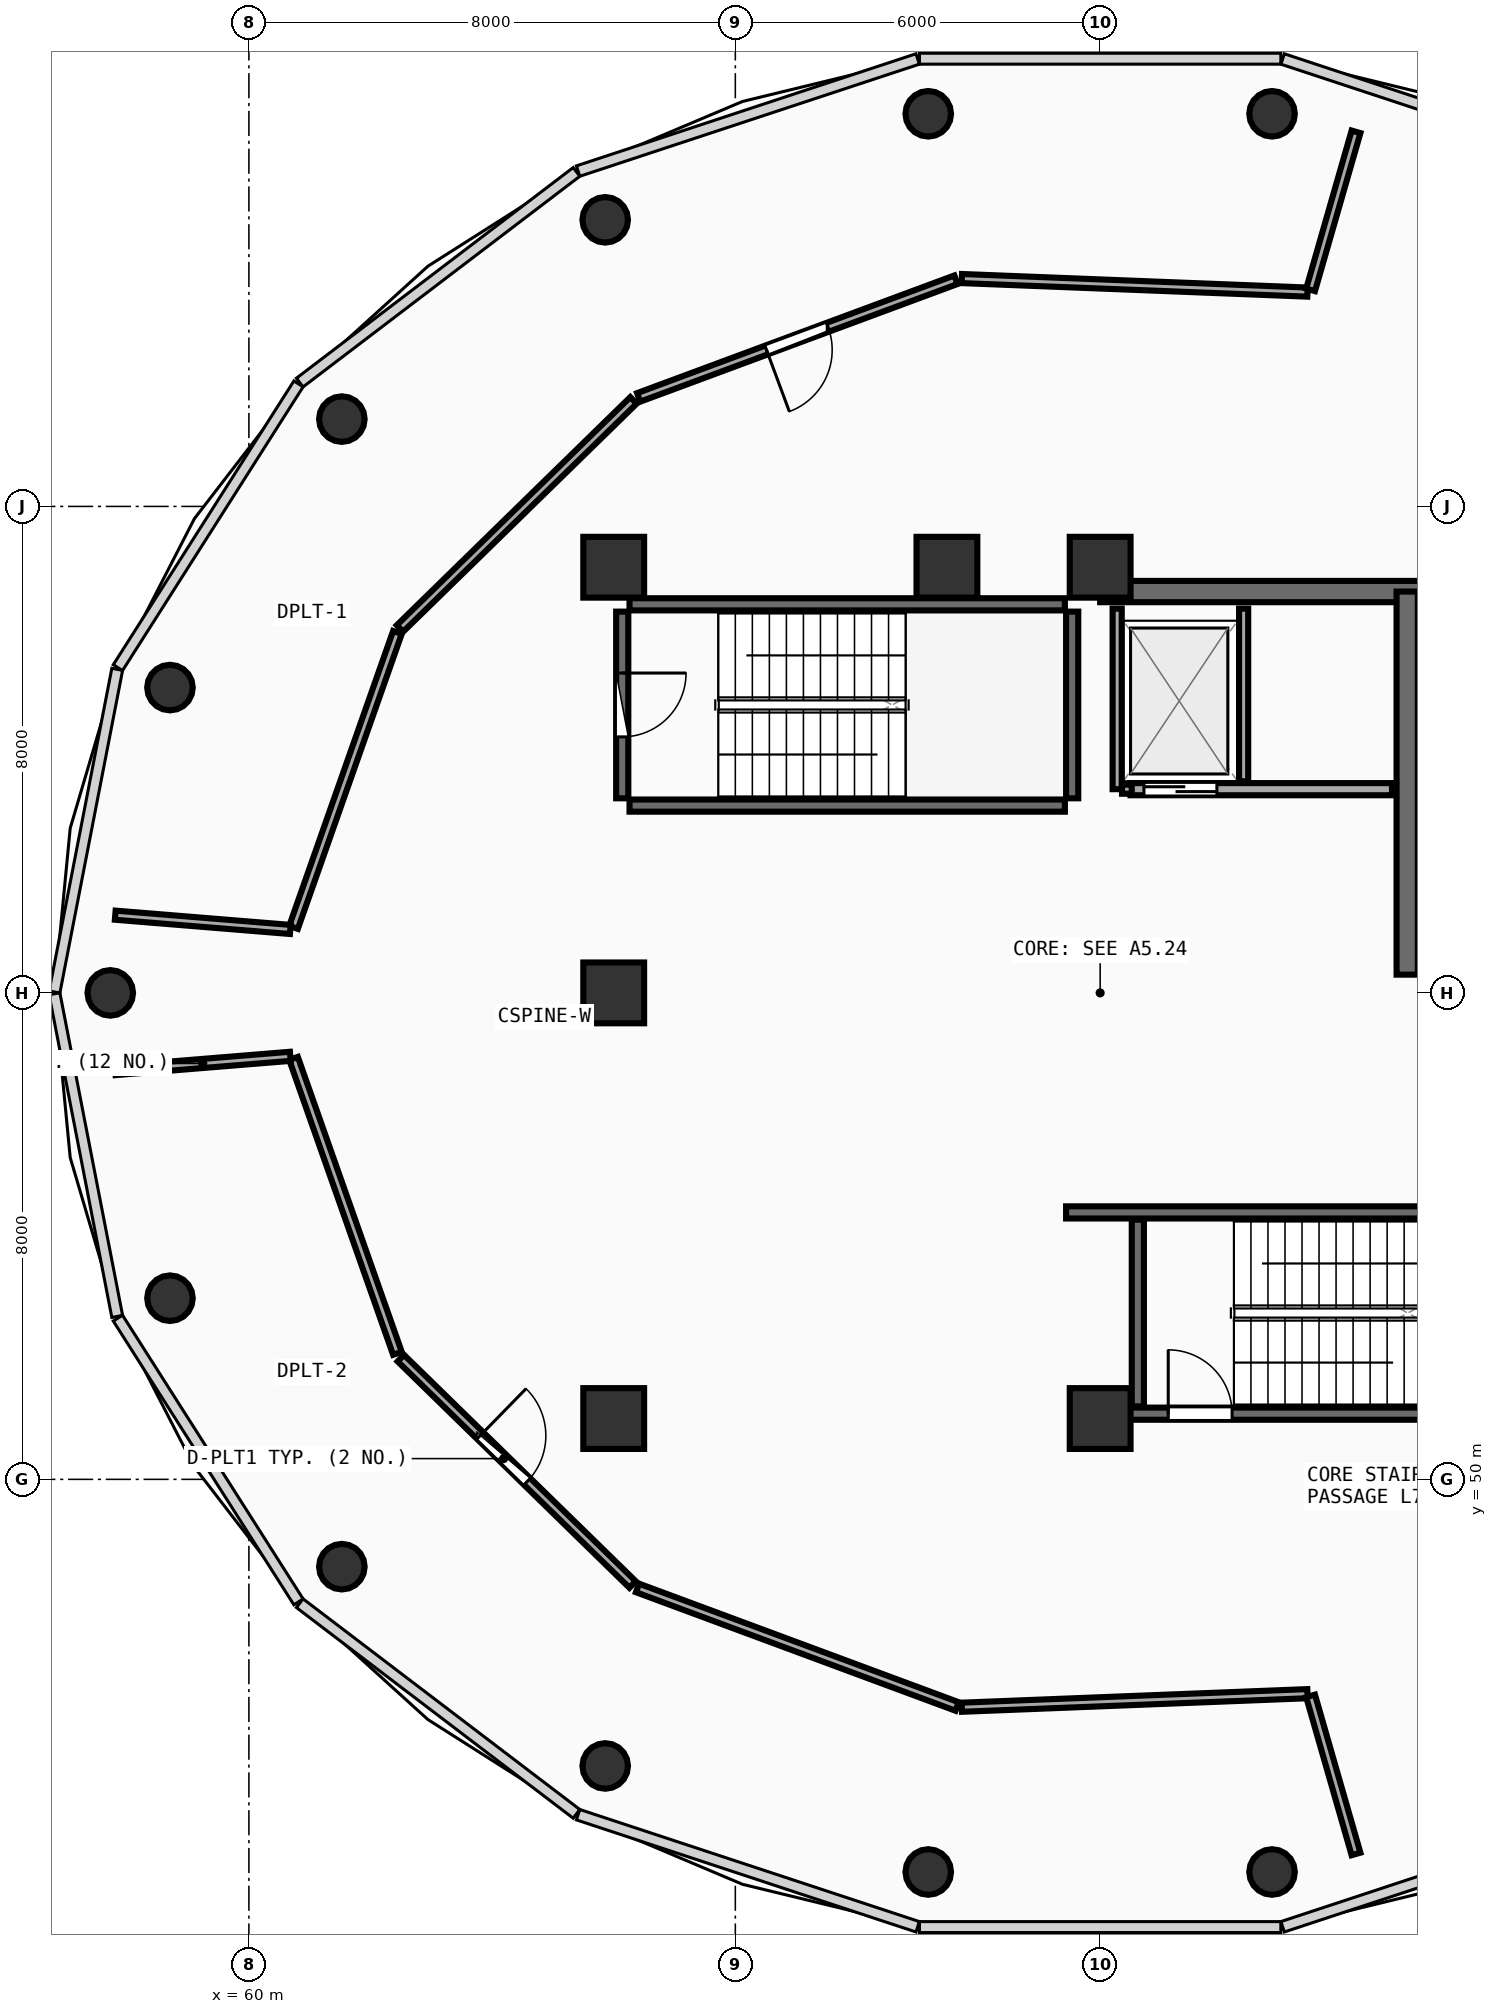
"""IFC4 building model, lengths in metres.
Left out: names, types, materials, properties, quantities, classifications, styles, units other than length and angle.
Written with IfcOpenShell. Run it as: python <this file> out.ifc"""

import sys

from ifc_helpers import new_model, si_unit, direction, frame, frame_2d, origin, origin_2d, place, context, subcontext, project, spatial, rectangle, circle, extrude, element, fill, save


model = new_model("IFC4")
c1 = context("Model", 3, precision=1e-05, world=origin(), true_north=direction((0.0, 1.0)))
c2 = subcontext(c1, "Body", "Model", "MODEL_VIEW")
j1 = project(units=[si_unit("LENGTHUNIT", "METRE"), si_unit("PLANEANGLEUNIT", "RADIAN")], contexts=[c1])
p1 = place(None, origin())
s1 = spatial("IfcSite", under=j1, at=p1, CompositionType="ELEMENT")
p2 = place(p1, origin())
s2 = spatial("IfcBuilding", under=s1, at=p2, CompositionType="ELEMENT")
p3 = place(p2, frame((0.0, 0.0, 306.9)))
s3 = spatial("IfcBuildingStorey", under=s2, at=p3, CompositionType="ELEMENT", Elevation=306.9)
for number, where, z_axis, x_axis in (
    (1, (66.0, 51.0, 0.0), (0.0, 0.0, 1.0), (1.0, 0.0, 0.0)),
    (2, (74.0, 51.0, 0.0), (0.0, 0.0, 1.0), (1.0, 0.0, 0.0)),
    (3, (74.0, 65.0, 0.0), (0.0, 0.0, 1.0), (1.0, 0.0, 0.0)),
    (4, (71.48, 65.0, 0.0), (0.0, 0.0, 1.0), (1.0, 0.0, 0.0)),
    (5, (66.0, 65.0, 0.0), (0.0, 0.0, 1.0), (1.0, 0.0, 0.0)),
    (6, (66.0, 58.0, 0.0), (0.0, 0.0, 1.0), (1.0, 0.0, 0.0)),
):
    element("IfcColumn", number, at=place(p3, frame(where, z_axis=z_axis, x_axis=x_axis)), inside=s3, PredefinedType="PILASTER", context=c2, shape_type="SweptSolid", body=[
        extrude(rectangle(XDim=1.0, YDim=1.0, at=origin_2d()), origin(), (0.0, 0.0, 1.0), 4.2),
    ])
for number, where, z_axis, x_axis in (
    (7, (76.827, 72.457, 0.0), (0.0, 0.0, 1.0), (1.0, 0.0, 0.0)),
    (8, (71.173, 72.457, 0.0), (0.0, 0.0, 1.0), (1.0, 0.0, 0.0)),
    (9, (65.86, 70.713, 0.0), (0.0, 0.0, 1.0), (1.0, 0.0, 0.0)),
    (10, (61.529, 67.436, 0.0), (0.0, 0.0, 1.0), (1.0, 0.0, 0.0)),
    (11, (58.702, 63.021, 0.0), (0.0, 0.0, 1.0), (1.0, 0.0, 0.0)),
    (12, (57.72, 58.0, 0.0), (0.0, 0.0, 1.0), (1.0, 0.0, 0.0)),
    (13, (58.702, 52.979, 0.0), (0.0, 0.0, 1.0), (1.0, 0.0, 0.0)),
    (14, (61.529, 48.564, 0.0), (0.0, 0.0, 1.0), (1.0, 0.0, 0.0)),
    (15, (65.86, 45.287, 0.0), (0.0, 0.0, 1.0), (1.0, 0.0, 0.0)),
    (16, (71.173, 43.543, 0.0), (0.0, 0.0, 1.0), (1.0, 0.0, 0.0)),
    (17, (76.827, 43.543, 0.0), (0.0, 0.0, 1.0), (1.0, 0.0, 0.0)),
):
    element("IfcColumn", number, at=place(p3, frame(where, z_axis=z_axis, x_axis=x_axis)), inside=s3, PredefinedType="COLUMN", context=c2, shape_type="SweptSolid", body=[
        extrude(circle(Radius=0.375, at=origin_2d()), origin(), (0.0, 0.0, 1.0), 4.2),
    ])
p4 = place(p3, frame((66.26, 61.08, 0.0), z_axis=(0.0, 0.0, 1.0), x_axis=(1.0, 0.0, 0.0)))
e18 = element("IfcWall", 18, at=p4, inside=s3, PredefinedType="SHEAR", context=c2, shape_type="SweptSolid", body=[
    extrude(rectangle(XDim=7.16, YDim=0.2, at=frame_2d((3.58, 0.0))), origin(), (0.0, 0.0, 1.0), 3.92),
])
p5 = place(p3, frame((73.54, 61.2, 0.0), z_axis=(0.0, 0.0, 1.0), x_axis=(0.0, 1.0, 0.0)))
e19 = element("IfcWall", 19, at=p5, inside=s3, PredefinedType="SHEAR", context=c2, shape_type="SweptSolid", body=[
    extrude(rectangle(XDim=3.07, YDim=0.2, at=frame_2d((1.535, 0.0))), origin(), (0.0, 0.0, 1.0), 3.92),
])
p6 = place(p3, frame((73.42, 64.39, 0.0), z_axis=(0.0, 0.0, 1.0), x_axis=(-1.0, 0.0, 0.0)))
e20 = element("IfcWall", 20, at=p6, inside=s3, PredefinedType="SHEAR", context=c2, shape_type="SweptSolid", body=[
    extrude(rectangle(XDim=7.16, YDim=0.2, at=frame_2d((3.58, 0.0))), origin(), (0.0, 0.0, 1.0), 3.92),
])
p7 = place(p3, frame((66.14, 64.27, 0.0), z_axis=(0.0, 0.0, 1.0), x_axis=(0.0, -1.0, 0.0)))
e21 = element("IfcWall", 21, at=p7, inside=s3, PredefinedType="SHEAR", context=c2, shape_type="SweptSolid", body=[
    extrude(rectangle(XDim=3.07, YDim=0.2, at=frame_2d((1.535, 0.0))), origin(), (0.0, 0.0, 1.0), 3.92),
])
p8 = place(p7, frame((1.01, 0.0, 0.0)))
e22 = element("IfcOpeningElement", 22, at=p8, cuts=e21, PredefinedType="OPENING", context=c2, shape_type="SweptSolid", body=[
    extrude(rectangle(XDim=1.05, YDim=2.1, at=frame_2d((0.525, 1.05))), frame((0.0, 0.11, 0.0), z_axis=(0.0, -1.0, 0.0), x_axis=(1.0, 0.0, 0.0)), (0.0, 0.0, 1.0), 0.22),
])
p9 = place(p3, frame((74.0, 51.08, 0.0), z_axis=(0.0, 0.0, 1.0), x_axis=(1.0, 0.0, 0.0)))
e23 = element("IfcWall", 23, at=p9, inside=s3, PredefinedType="SHEAR", context=c2, shape_type="SweptSolid", body=[
    extrude(rectangle(XDim=7.9, YDim=0.2, at=frame_2d((3.95, 0.0))), origin(), (0.0, 0.0, 1.0), 3.92),
])
p10 = place(p9, frame((1.12, 0.0, 0.0)))
e24 = element("IfcOpeningElement", 24, at=p10, cuts=e23, PredefinedType="OPENING", context=c2, shape_type="SweptSolid", body=[
    extrude(rectangle(XDim=1.05, YDim=2.1, at=frame_2d((0.525, 1.05))), frame((0.0, 0.11, 0.0), z_axis=(0.0, -1.0, 0.0), x_axis=(1.0, 0.0, 0.0)), (0.0, 0.0, 1.0), 0.22),
])
p11 = place(p3, frame((81.9, 54.39, 0.0), z_axis=(0.0, 0.0, 1.0), x_axis=(-1.0, 0.0, 0.0)))
e25 = element("IfcWall", 25, at=p11, inside=s3, PredefinedType="SHEAR", context=c2, shape_type="SweptSolid", body=[
    extrude(rectangle(XDim=8.46, YDim=0.2, at=frame_2d((4.23, 0.0))), origin(), (0.0, 0.0, 1.0), 3.92),
])
p12 = place(p3, frame((74.62, 54.27, 0.0), z_axis=(0.0, 0.0, 1.0), x_axis=(0.0, -1.0, 0.0)))
e26 = element("IfcWall", 26, at=p12, inside=s3, PredefinedType="SHEAR", context=c2, shape_type="SweptSolid", body=[
    extrude(rectangle(XDim=3.07, YDim=0.2, at=frame_2d((1.535, 0.0))), origin(), (0.0, 0.0, 1.0), 3.92),
])
p13 = place(p3, frame((74.0, 64.6, 0.0), z_axis=(0.0, 0.0, 1.0), x_axis=(1.0, 0.0, 0.0)))
e27 = element("IfcWall", 27, at=p13, inside=s3, PredefinedType="SHEAR", context=c2, shape_type="SweptSolid", body=[
    extrude(rectangle(XDim=8.0, YDim=0.35, at=frame_2d((4.0, 0.0))), origin(), (0.0, 0.0, 1.0), 3.98),
])
p14 = place(p3, frame((79.05, 58.3, 0.0), z_axis=(0.0, 0.0, 1.0), x_axis=(0.0, 1.0, 0.0)))
e28 = element("IfcWall", 28, at=p14, inside=s3, PredefinedType="SHEAR", context=c2, shape_type="SweptSolid", body=[
    extrude(rectangle(XDim=6.3, YDim=0.35, at=frame_2d((3.15, 0.0))), origin(), (0.0, 0.0, 1.0), 3.98),
])
p15 = place(p3, frame((74.5, 61.35, 0.0), z_axis=(0.0, 0.0, 1.0), x_axis=(1.0, 0.0, 0.0)))
e29 = element("IfcWall", 29, at=p15, inside=s3, PredefinedType="SOLIDWALL", context=c2, shape_type="SweptSolid", body=[
    extrude(rectangle(XDim=4.3, YDim=0.2, at=frame_2d((2.15, 0.0))), origin(), (0.0, 0.0, 1.0), 3.97),
])
p16 = place(p15, frame((0.22, 0.0, 0.0)))
e30 = element("IfcOpeningElement", 30, at=p16, cuts=e29, PredefinedType="OPENING", context=c2, shape_type="SweptSolid", body=[
    extrude(rectangle(XDim=1.2, YDim=2.15, at=frame_2d((0.6, 1.075))), frame((0.0, 0.11, 0.0), z_axis=(0.0, -1.0, 0.0), x_axis=(1.0, 0.0, 0.0)), (0.0, 0.0, 1.0), 0.22),
])
p17 = place(p3, frame((74.28, 61.35, 0.0), z_axis=(0.0, 0.0, 1.0), x_axis=(0.0, 1.0, 0.0)))
e31 = element("IfcWall", 31, at=p17, inside=s3, PredefinedType="PARTITIONING", context=c2, shape_type="SweptSolid", body=[
    extrude(rectangle(XDim=2.97, YDim=0.15, at=frame_2d((1.485, 0.0))), origin(), (0.0, 0.0, 1.0), 1.365),
])
p18 = place(p3, frame((74.36, 61.35, 0.0), z_axis=(0.0, 0.0, 1.0), x_axis=(1.0, 0.0, 0.0)))
e32 = element("IfcWall", 32, at=p18, inside=s3, PredefinedType="PARTITIONING", context=c2, shape_type="SweptSolid", body=[
    extrude(rectangle(XDim=0.16, YDim=0.15, at=frame_2d((0.08, 0.0))), origin(), (0.0, 0.0, 1.0), 1.365),
])
p19 = place(p3, frame((76.36, 61.48, 0.0), z_axis=(0.0, 0.0, 1.0), x_axis=(0.0, 1.0, 0.0)))
e33 = element("IfcWall", 33, at=p19, inside=s3, PredefinedType="PARTITIONING", context=c2, shape_type="SweptSolid", body=[
    extrude(rectangle(XDim=2.84, YDim=0.15, at=frame_2d((1.42, 0.0))), origin(), (0.0, 0.0, 1.0), 3.97),
])
p20 = place(p3, frame((71.629, 69.728, 0.0), z_axis=(0.0, 0.0, 1.0), x_axis=(-0.937610047719, -0.34768865155, 0.0)))
e34 = element("IfcWall", 34, at=p20, inside=s3, PredefinedType="PARTITIONING", context=c2, shape_type="SweptSolid", body=[
    extrude(rectangle(XDim=5.565, YDim=0.15, at=frame_2d((2.783, 0.0))), origin(), (0.0, 0.0, 1.0), 3.565),
])
p21 = place(p20, frame((2.243, 0.0, 0.0)))
e35 = element("IfcOpeningElement", 35, at=p21, cuts=e34, PredefinedType="OPENING", context=c2, shape_type="SweptSolid", body=[
    extrude(rectangle(XDim=1.08, YDim=2.1, at=frame_2d((0.54, 1.05))), frame((0.0, 0.085, 0.0), z_axis=(0.0, -1.0, 0.0), x_axis=(1.0, 0.0, 0.0)), (0.0, 0.0, 1.0), 0.17),
])
p22 = place(p3, frame((62.499, 51.993, 0.0), z_axis=(0.0, 0.0, 1.0), x_axis=(0.71541878573, -0.698695900249, 0.0)))
e36 = element("IfcWall", 36, at=p22, inside=s3, PredefinedType="PARTITIONING", context=c2, shape_type="SweptSolid", body=[
    extrude(rectangle(XDim=5.329, YDim=0.15, at=frame_2d((2.664, 0.0))), origin(), (0.0, 0.0, 1.0), 3.565),
])
p23 = place(p22, frame((1.824, 0.0, 0.0)))
e37 = element("IfcOpeningElement", 37, at=p23, cuts=e36, PredefinedType="OPENING", context=c2, shape_type="SweptSolid", body=[
    extrude(rectangle(XDim=1.08, YDim=2.1, at=frame_2d((0.54, 1.05))), frame((0.0, 0.085, 0.0), z_axis=(0.0, -1.0, 0.0), x_axis=(1.0, 0.0, 0.0)), (0.0, 0.0, 1.0), 0.17),
])
p24 = place(p3, frame((77.41, 69.525, 0.0), z_axis=(0.0, 0.0, 1.0), x_axis=(-0.999233860457, 0.03913683834, 0.0)))
e38 = element("IfcWall", 38, at=p24, inside=s3, PredefinedType="PARTITIONING", context=c2, shape_type="SweptSolid", body=[
    extrude(rectangle(XDim=5.689, YDim=0.15, at=frame_2d((2.845, 0.0))), origin(), (0.0, 0.0, 1.0), 3.565),
])
p25 = place(p3, frame((66.325, 67.744, 0.0), z_axis=(0.0, 0.0, 1.0), x_axis=(-0.715402081333, -0.698713004047, 0.0)))
e39 = element("IfcWall", 39, at=p25, inside=s3, PredefinedType="PARTITIONING", context=c2, shape_type="SweptSolid", body=[
    extrude(rectangle(XDim=5.369, YDim=0.15, at=frame_2d((2.684, 0.0))), origin(), (0.0, 0.0, 1.0), 3.565),
])
p26 = place(p3, frame((62.443, 63.927, 0.0), z_axis=(0.0, 0.0, 1.0), x_axis=(-0.332236382146, -0.943196154773, 0.0)))
e40 = element("IfcWall", 40, at=p26, inside=s3, PredefinedType="PARTITIONING", context=c2, shape_type="SweptSolid", body=[
    extrude(rectangle(XDim=5.142, YDim=0.15, at=frame_2d((2.571, 0.0))), origin(), (0.0, 0.0, 1.0), 3.565),
])
p27 = place(p3, frame((60.681, 59.043, 0.0), z_axis=(0.0, 0.0, 1.0), x_axis=(-0.996696214814, 0.081219796696, 0.0)))
e41 = element("IfcWall", 41, at=p27, inside=s3, PredefinedType="PARTITIONING", context=c2, shape_type="SweptSolid", body=[
    extrude(rectangle(XDim=2.889, YDim=0.15, at=frame_2d((1.444, 0.0))), origin(), (0.0, 0.0, 1.0), 3.565),
])
p28 = place(p3, frame((78.208, 72.161, 0.0), z_axis=(0.0, 0.0, 1.0), x_axis=(-0.276223004297, -0.961093570833, 0.0)))
e42 = element("IfcWall", 42, at=p28, inside=s3, PredefinedType="PARTITIONING", context=c2, shape_type="SweptSolid", body=[
    extrude(rectangle(XDim=2.705, YDim=0.15, at=frame_2d((1.352, 0.0))), origin(), (0.0, 0.0, 1.0), 3.565),
])
p29 = place(p3, frame((60.734, 56.922, 0.0), z_axis=(0.0, 0.0, 1.0), x_axis=(0.332236382146, -0.943196154773, 0.0)))
e43 = element("IfcWall", 43, at=p29, inside=s3, PredefinedType="PARTITIONING", context=c2, shape_type="SweptSolid", body=[
    extrude(rectangle(XDim=5.142, YDim=0.15, at=frame_2d((2.571, 0.0))), origin(), (0.0, 0.0, 1.0), 3.565),
])
p30 = place(p3, frame((66.392, 48.214, 0.0), z_axis=(0.0, 0.0, 1.0), x_axis=(0.937597367655, -0.347722843894, 0.0)))
e44 = element("IfcWall", 44, at=p30, inside=s3, PredefinedType="PARTITIONING", context=c2, shape_type="SweptSolid", body=[
    extrude(rectangle(XDim=5.606, YDim=0.15, at=frame_2d((2.803, 0.0))), origin(), (0.0, 0.0, 1.0), 3.665),
])
p31 = place(p3, frame((71.725, 46.253, 0.0), z_axis=(0.0, 0.0, 1.0), x_axis=(0.999233860457, 0.03913683834, 0.0)))
e45 = element("IfcWall", 45, at=p31, inside=s3, PredefinedType="PARTITIONING", context=c2, shape_type="SweptSolid", body=[
    extrude(rectangle(XDim=5.689, YDim=0.15, at=frame_2d((2.845, 0.0))), origin(), (0.0, 0.0, 1.0), 3.565),
])
p32 = place(p3, frame((77.461, 46.439, 0.0), z_axis=(0.0, 0.0, 1.0), x_axis=(0.276223004297, -0.961093570833, 0.0)))
e46 = element("IfcWall", 46, at=p32, inside=s3, PredefinedType="PARTITIONING", context=c2, shape_type="SweptSolid", body=[
    extrude(rectangle(XDim=2.705, YDim=0.15, at=frame_2d((1.352, 0.0))), origin(), (0.0, 0.0, 1.0), 3.565),
])
p33 = place(p3, frame((57.802, 56.722, 0.0), z_axis=(0.0, 0.0, 1.0), x_axis=(0.996696214814, 0.081219796696, 0.0)))
e47 = element("IfcWall", 47, at=p33, inside=s3, PredefinedType="PARTITIONING", context=c2, shape_type="SweptSolid", body=[
    extrude(rectangle(XDim=2.889, YDim=0.15, at=frame_2d((1.444, 0.0))), origin(), (0.0, 0.0, 1.0), 3.565),
])
p34 = place(p8, origin())
e48 = element("IfcDoor", 48, at=p34, inside=s3, OperationType="SINGLE_SWING_LEFT", PredefinedType="DOOR", context=c2, shape_type="SweptSolid", body=[
    extrude(rectangle(XDim=1.05, YDim=2.1, at=frame_2d((0.525, 1.05))), frame((0.0, 0.025, 0.0), z_axis=(0.0, -1.0, 0.0), x_axis=(1.0, 0.0, 0.0)), (0.0, 0.0, 1.0), 0.05),
])
fill(e22, e48)
p35 = place(p10, origin())
e49 = element("IfcDoor", 49, at=p35, inside=s3, OperationType="SINGLE_SWING_LEFT", PredefinedType="DOOR", context=c2, shape_type="SweptSolid", body=[
    extrude(rectangle(XDim=1.05, YDim=2.1, at=frame_2d((0.525, 1.05))), frame((0.0, 0.025, 0.0), z_axis=(0.0, -1.0, 0.0), x_axis=(1.0, 0.0, 0.0)), (0.0, 0.0, 1.0), 0.05),
])
fill(e24, e49)
p36 = place(p16, origin())
e50 = element("IfcDoor", 50, at=p36, inside=s3, OperationType="DOUBLE_DOOR_SLIDING", PredefinedType="DOOR", context=c2, shape_type="SweptSolid", body=[
    extrude(rectangle(XDim=1.2, YDim=2.15, at=frame_2d((0.6, 1.075))), frame((0.0, 0.025, 0.0), z_axis=(0.0, -1.0, 0.0), x_axis=(1.0, 0.0, 0.0)), (0.0, 0.0, 1.0), 0.05),
])
fill(e30, e50)
p37 = place(p21, origin())
e51 = element("IfcDoor", 51, at=p37, inside=s3, OperationType="SINGLE_SWING_RIGHT", PredefinedType="DOOR", context=c2, shape_type="SweptSolid", body=[
    extrude(rectangle(XDim=1.08, YDim=2.1, at=frame_2d((0.54, 1.05))), frame((0.0, 0.025, 0.0), z_axis=(0.0, -1.0, 0.0), x_axis=(1.0, 0.0, 0.0)), (0.0, 0.0, 1.0), 0.05),
])
fill(e35, e51)
p38 = place(p23, origin())
e52 = element("IfcDoor", 52, at=p38, inside=s3, OperationType="SINGLE_SWING_LEFT", PredefinedType="DOOR", context=c2, shape_type="SweptSolid", body=[
    extrude(rectangle(XDim=1.08, YDim=2.1, at=frame_2d((0.54, 1.05))), frame((0.0, 0.025, 0.0), z_axis=(0.0, -1.0, 0.0), x_axis=(1.0, 0.0, 0.0)), (0.0, 0.0, 1.0), 0.05),
])
fill(e37, e52)
save(model, sys.argv[1])
